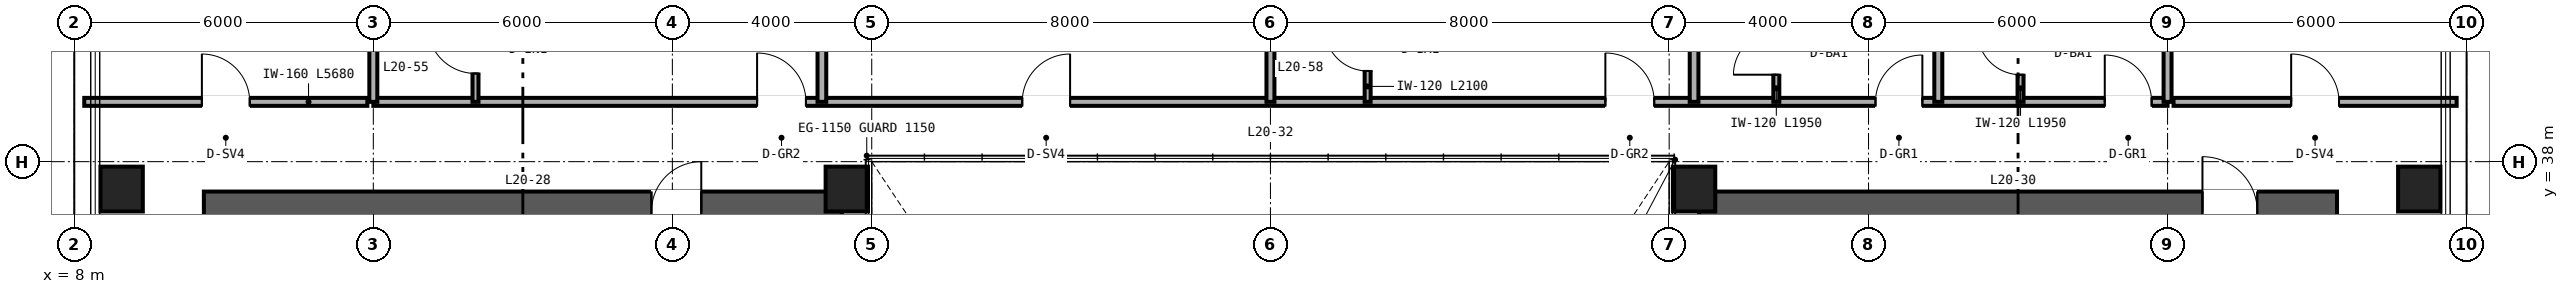
"""IFC4 building model, lengths in metres.
Left out: names, types, materials, properties, quantities, classifications, styles, units other than length and angle.
Written with IfcOpenShell. Run it as: python <this file> out.ifc"""

import sys

from ifc_helpers import new_model, si_unit, direction, frame, frame_2d, origin, origin_2d, place, context, subcontext, project, spatial, rectangle, hollow_rectangle, extrude, source, transform, mapped, element, fill, save


model = new_model("IFC4")
c1 = context("Model", 3, precision=1e-05, world=origin(), true_north=direction((0.0, 1.0)))
c2 = subcontext(c1, "Body", "Model", "MODEL_VIEW")
j1 = project(units=[si_unit("LENGTHUNIT", "METRE"), si_unit("PLANEANGLEUNIT", "RADIAN")], contexts=[c1])
p1 = place(None, origin())
s1 = spatial("IfcSite", under=j1, at=p1, CompositionType="ELEMENT")
p2 = place(p1, origin())
s2 = spatial("IfcBuilding", under=s1, at=p2, CompositionType="ELEMENT")
p3 = place(p2, frame((0.0, 0.0, 81.6)))
s3 = spatial("IfcBuildingStorey", under=s2, at=p3, CompositionType="ELEMENT", Elevation=81.6)
p4 = place(p3, frame((10.6, 37.0, 0.0), z_axis=(0.0, 0.0, 1.0), x_axis=(1.0, 0.0, 0.0)))
e1 = element("IfcWall", 1, at=p4, inside=s3, PredefinedType="SHEAR", context=c2, shape_type="SweptSolid", body=[
    extrude(rectangle(XDim=12.8, YDim=0.8, at=frame_2d((6.4, 0.0))), origin(), (0.0, 0.0, 1.0), 3.28),
])
p5 = place(p4, frame((8.98, 0.0, 0.0)))
e2 = element("IfcOpeningElement", 2, at=p5, cuts=e1, PredefinedType="OPENING", context=c2, shape_type="SweptSolid", body=[
    extrude(rectangle(XDim=1.0, YDim=2.15, at=frame_2d((0.5, 1.075))), frame((0.0, 0.41, 0.0), z_axis=(0.0, -1.0, 0.0), x_axis=(1.0, 0.0, 0.0)), (0.0, 0.0, 1.0), 0.82),
])
p6 = place(p3, frame((40.6, 37.0, 0.0), z_axis=(0.0, 0.0, 1.0), x_axis=(1.0, 0.0, 0.0)))
e3 = element("IfcWall", 3, at=p6, inside=s3, PredefinedType="SHEAR", context=c2, shape_type="SweptSolid", body=[
    extrude(rectangle(XDim=12.8, YDim=0.8, at=frame_2d((6.4, 0.0))), origin(), (0.0, 0.0, 1.0), 3.28),
])
p7 = place(p6, frame((10.1, 0.0, 0.0)))
e4 = element("IfcOpeningElement", 4, at=p7, cuts=e3, PredefinedType="OPENING", context=c2, shape_type="SweptSolid", body=[
    extrude(rectangle(XDim=1.1, YDim=2.15, at=frame_2d((0.55, 1.075))), frame((0.0, 0.41, 0.0), z_axis=(0.0, -1.0, 0.0), x_axis=(1.0, 0.0, 0.0)), (0.0, 0.0, 1.0), 0.82),
])
m1 = source(origin(), c2, "Body", "SweptSolid", [
    extrude(hollow_rectangle(XDim=0.85, YDim=0.9, WallThickness=0.04, at=origin_2d()), origin(), (0.0, 0.0, 1.0), 3.28),
])
for number, where, z_axis, x_axis in (
    (5, (8.95, 37.45, 0.0), (0.0, 0.0, 1.0), (1.0, 0.0, 0.0)),
    (6, (23.5, 37.45, 0.0), (0.0, 0.0, 1.0), (1.0, 0.0, 0.0)),
    (7, (40.5, 37.45, 0.0), (0.0, 0.0, 1.0), (1.0, 0.0, 0.0)),
    (8, (55.05, 37.45, 0.0), (0.0, 0.0, 1.0), (1.0, 0.0, 0.0)),
):
    element("IfcColumn", number, at=place(p3, frame(where, z_axis=z_axis, x_axis=x_axis)), inside=s3, PredefinedType="COLUMN", context=c2, shape_type="MappedRepresentation", body=[
        mapped(m1, transform((0.0, 0.0, 0.0), scale=1.0)),
    ])
p8 = place(p3, frame((8.2, 39.2, 0.0), z_axis=(0.0, 0.0, 1.0), x_axis=(1.0, 0.0, 0.0)))
e9 = element("IfcWall", 9, at=p8, inside=s3, PredefinedType="PARTITIONING", context=c2, shape_type="SweptSolid", body=[
    extrude(rectangle(XDim=5.68, YDim=0.16, at=frame_2d((2.84, 0.0))), origin(), (0.0, 0.0, 1.0), 3.28),
])
p9 = place(p8, frame((2.36, 0.0, 0.0)))
e10 = element("IfcOpeningElement", 10, at=p9, cuts=e9, PredefinedType="OPENING", context=c2, shape_type="SweptSolid", body=[
    extrude(rectangle(XDim=0.96, YDim=2.15, at=frame_2d((0.48, 1.075))), frame((0.0, 0.09, 0.0), z_axis=(0.0, -1.0, 0.0), x_axis=(1.0, 0.0, 0.0)), (0.0, 0.0, 1.0), 0.18),
])
p10 = place(p3, frame((50.12, 39.2, 0.0), z_axis=(0.0, 0.0, 1.0), x_axis=(1.0, 0.0, 0.0)))
e11 = element("IfcWall", 11, at=p10, inside=s3, PredefinedType="PARTITIONING", context=c2, shape_type="SweptSolid", body=[
    extrude(rectangle(XDim=5.68, YDim=0.16, at=frame_2d((2.84, 0.0))), origin(), (0.0, 0.0, 1.0), 3.28),
])
p11 = place(p10, frame((2.36, 0.0, 0.0)))
e12 = element("IfcOpeningElement", 12, at=p11, cuts=e11, PredefinedType="OPENING", context=c2, shape_type="SweptSolid", body=[
    extrude(rectangle(XDim=0.96, YDim=2.15, at=frame_2d((0.48, 1.075))), frame((0.0, 0.09, 0.0), z_axis=(0.0, -1.0, 0.0), x_axis=(1.0, 0.0, 0.0)), (0.0, 0.0, 1.0), 0.18),
])
p12 = place(p3, frame((14.0, 39.2, 0.0), z_axis=(0.0, 0.0, 1.0), x_axis=(1.0, 0.0, 0.0)))
e13 = element("IfcWall", 13, at=p12, inside=s3, PredefinedType="PARTITIONING", context=c2, shape_type="SweptSolid", body=[
    extrude(rectangle(XDim=36.0, YDim=0.16, at=frame_2d((18.0, 0.0))), origin(), (0.0, 0.0, 1.0), 2.501),
])
p13 = place(p12, frame((7.7, 0.0, 0.0)))
e14 = element("IfcOpeningElement", 14, at=p13, cuts=e13, PredefinedType="OPENING", context=c2, shape_type="SweptSolid", body=[
    extrude(rectangle(XDim=0.98, YDim=2.2, at=frame_2d((0.49, 1.1))), frame((0.0, 0.09, 0.0), z_axis=(0.0, -1.0, 0.0), x_axis=(1.0, 0.0, 0.0)), (0.0, 0.0, 1.0), 0.18),
])
p14 = place(p12, frame((13.02, 0.0, 0.0)))
e15 = element("IfcOpeningElement", 15, at=p14, cuts=e13, PredefinedType="OPENING", context=c2, shape_type="SweptSolid", body=[
    extrude(rectangle(XDim=0.96, YDim=2.15, at=frame_2d((0.48, 1.075))), frame((0.0, 0.09, 0.0), z_axis=(0.0, -1.0, 0.0), x_axis=(1.0, 0.0, 0.0)), (0.0, 0.0, 1.0), 0.18),
])
p15 = place(p12, frame((24.72, 0.0, 0.0)))
e16 = element("IfcOpeningElement", 16, at=p15, cuts=e13, PredefinedType="OPENING", context=c2, shape_type="SweptSolid", body=[
    extrude(rectangle(XDim=0.98, YDim=2.2, at=frame_2d((0.49, 1.1))), frame((0.0, 0.09, 0.0), z_axis=(0.0, -1.0, 0.0), x_axis=(1.0, 0.0, 0.0)), (0.0, 0.0, 1.0), 0.18),
])
p16 = place(p12, frame((30.14, 0.0, 0.0)))
e17 = element("IfcOpeningElement", 17, at=p16, cuts=e13, PredefinedType="OPENING", context=c2, shape_type="SweptSolid", body=[
    extrude(rectangle(XDim=0.94, YDim=2.15, at=frame_2d((0.47, 1.075))), frame((0.0, 0.09, 0.0), z_axis=(0.0, -1.0, 0.0), x_axis=(1.0, 0.0, 0.0)), (0.0, 0.0, 1.0), 0.18),
])
p17 = place(p12, frame((34.74, 0.0, 0.0)))
e18 = element("IfcOpeningElement", 18, at=p17, cuts=e13, PredefinedType="OPENING", context=c2, shape_type="SweptSolid", body=[
    extrude(rectangle(XDim=0.94, YDim=2.15, at=frame_2d((0.47, 1.075))), frame((0.0, 0.09, 0.0), z_axis=(0.0, -1.0, 0.0), x_axis=(1.0, 0.0, 0.0)), (0.0, 0.0, 1.0), 0.18),
])
for number, where, z_axis, x_axis in (
    (19, (14.0, 39.2, 0.0), (0.0, 0.0, 1.0), (0.0, 1.0, 0.0)),
    (20, (50.0, 39.2, 0.0), (0.0, 0.0, 1.0), (0.0, 1.0, 0.0)),
):
    element("IfcWall", number, at=place(p3, frame(where, z_axis=z_axis, x_axis=x_axis)), inside=s3, PredefinedType="PARTITIONING", context=c2, shape_type="SweptSolid", body=[
        extrude(rectangle(XDim=10.44, YDim=0.16, at=frame_2d((5.22, 0.0))), origin(), (0.0, 0.0, 1.0), 2.587),
    ])
p18 = place(p3, frame((23.0, 39.2, 0.0), z_axis=(0.0, 0.0, 1.0), x_axis=(0.0, 1.0, 0.0)))
e21 = element("IfcWall", 21, at=p18, inside=s3, PredefinedType="PARTITIONING", context=c2, shape_type="SweptSolid", body=[
    extrude(rectangle(XDim=10.44, YDim=0.175, at=frame_2d((5.22, 0.0))), origin(), (0.0, 0.0, 1.0), 2.743),
])
p19 = place(p3, frame((16.05, 39.2, 0.0), z_axis=(0.0, 0.0, 1.0), x_axis=(0.0, 1.0, 0.0)))
e22 = element("IfcWall", 22, at=p19, inside=s3, PredefinedType="PARTITIONING", context=c2, shape_type="SweptSolid", body=[
    extrude(rectangle(XDim=2.1, YDim=0.12, at=frame_2d((1.05, 0.0))), origin(), (0.0, 0.0, 1.0), 3.28),
])
p20 = place(p19, frame((0.57, 0.0, 0.0)))
e23 = element("IfcOpeningElement", 23, at=p20, cuts=e22, PredefinedType="OPENING", context=c2, shape_type="SweptSolid", body=[
    extrude(rectangle(XDim=0.96, YDim=2.15, at=frame_2d((0.48, 1.075))), frame((0.0, 0.07, 0.0), z_axis=(0.0, -1.0, 0.0), x_axis=(1.0, 0.0, 0.0)), (0.0, 0.0, 1.0), 0.14),
])
p21 = place(p3, frame((32.0, 39.2, 0.0), z_axis=(0.0, 0.0, 1.0), x_axis=(0.0, 1.0, 0.0)))
e24 = element("IfcWall", 24, at=p21, inside=s3, PredefinedType="PARTITIONING", context=c2, shape_type="SweptSolid", body=[
    extrude(rectangle(XDim=10.44, YDim=0.16, at=frame_2d((5.22, 0.0))), origin(), (0.0, 0.0, 1.0), 2.36),
])
p22 = place(p3, frame((40.5, 39.2, 0.0), z_axis=(0.0, 0.0, 1.0), x_axis=(0.0, 1.0, 0.0)))
e25 = element("IfcWall", 25, at=p22, inside=s3, PredefinedType="PARTITIONING", context=c2, shape_type="SweptSolid", body=[
    extrude(rectangle(XDim=10.44, YDim=0.175, at=frame_2d((5.22, 0.0))), origin(), (0.0, 0.0, 1.0), 2.36),
])
p23 = place(p3, frame((33.95, 39.2, 0.0), z_axis=(0.0, 0.0, 1.0), x_axis=(0.0, 1.0, 0.0)))
e26 = element("IfcWall", 26, at=p23, inside=s3, PredefinedType="PARTITIONING", context=c2, shape_type="SweptSolid", body=[
    extrude(rectangle(XDim=2.1, YDim=0.12, at=frame_2d((1.05, 0.0))), origin(), (0.0, 0.0, 1.0), 3.28),
])
p24 = place(p23, frame((0.62, 0.0, 0.0)))
e27 = element("IfcOpeningElement", 27, at=p24, cuts=e26, PredefinedType="OPENING", context=c2, shape_type="SweptSolid", body=[
    extrude(rectangle(XDim=0.86, YDim=2.1, at=frame_2d((0.43, 1.05))), frame((0.0, 0.07, 0.0), z_axis=(0.0, -1.0, 0.0), x_axis=(1.0, 0.0, 0.0)), (0.0, 0.0, 1.0), 0.14),
])
p25 = place(p3, frame((45.4, 39.2, 0.0), z_axis=(0.0, 0.0, 1.0), x_axis=(0.0, 1.0, 0.0)))
e28 = element("IfcWall", 28, at=p25, inside=s3, PredefinedType="PARTITIONING", context=c2, shape_type="SweptSolid", body=[
    extrude(rectangle(XDim=10.44, YDim=0.16, at=frame_2d((5.22, 0.0))), origin(), (0.0, 0.0, 1.0), 2.587),
])
p26 = place(p3, frame((42.15, 39.2, 0.0), z_axis=(0.0, 0.0, 1.0), x_axis=(0.0, 1.0, 0.0)))
e29 = element("IfcWall", 29, at=p26, inside=s3, PredefinedType="PARTITIONING", context=c2, shape_type="SweptSolid", body=[
    extrude(rectangle(XDim=1.95, YDim=0.12, at=frame_2d((0.975, 0.0))), origin(), (0.0, 0.0, 1.0), 3.28),
])
p27 = place(p26, frame((0.545, 0.0, 0.0)))
e30 = element("IfcOpeningElement", 30, at=p27, cuts=e29, PredefinedType="OPENING", context=c2, shape_type="SweptSolid", body=[
    extrude(rectangle(XDim=0.86, YDim=2.1, at=frame_2d((0.43, 1.05))), frame((0.0, 0.07, 0.0), z_axis=(0.0, -1.0, 0.0), x_axis=(1.0, 0.0, 0.0)), (0.0, 0.0, 1.0), 0.14),
])
p28 = place(p3, frame((47.05, 39.2, 0.0), z_axis=(0.0, 0.0, 1.0), x_axis=(0.0, 1.0, 0.0)))
e31 = element("IfcWall", 31, at=p28, inside=s3, PredefinedType="PARTITIONING", context=c2, shape_type="SweptSolid", body=[
    extrude(rectangle(XDim=1.95, YDim=0.12, at=frame_2d((0.975, 0.0))), origin(), (0.0, 0.0, 1.0), 3.28),
])
p29 = place(p28, frame((0.545, 0.0, 0.0)))
e32 = element("IfcOpeningElement", 32, at=p29, cuts=e31, PredefinedType="OPENING", context=c2, shape_type="SweptSolid", body=[
    extrude(rectangle(XDim=0.86, YDim=2.1, at=frame_2d((0.43, 1.05))), frame((0.0, 0.07, 0.0), z_axis=(0.0, -1.0, 0.0), x_axis=(1.0, 0.0, 0.0)), (0.0, 0.0, 1.0), 0.14),
])
m2 = source(origin(), c2, "Body", "SweptSolid", [
    extrude(rectangle(XDim=1.0, YDim=2.15, at=frame_2d((0.5, 1.075))), frame((0.0, 0.025, 0.0), z_axis=(0.0, -1.0, 0.0), x_axis=(1.0, 0.0, 0.0)), (0.0, 0.0, 1.0), 0.05),
])
p30 = place(p5, origin())
e33 = element("IfcDoor", 33, at=p30, inside=s3, OperationType="SINGLE_SWING_RIGHT", PredefinedType="DOOR", context=c2, shape_type="MappedRepresentation", body=[
    mapped(m2, transform((0.0, 0.0, 0.0), scale=1.0)),
])
fill(e2, e33)
m3 = source(origin(), c2, "Body", "SweptSolid", [
    extrude(rectangle(XDim=1.1, YDim=2.15, at=frame_2d((0.55, 1.075))), frame((0.0, 0.025, 0.0), z_axis=(0.0, -1.0, 0.0), x_axis=(1.0, 0.0, 0.0)), (0.0, 0.0, 1.0), 0.05),
])
p31 = place(p7, origin())
e34 = element("IfcDoor", 34, at=p31, inside=s3, OperationType="SINGLE_SWING_LEFT", PredefinedType="DOOR", context=c2, shape_type="MappedRepresentation", body=[
    mapped(m3, transform((0.0, 0.0, 0.0), scale=1.0)),
])
fill(e4, e34)
m4 = source(origin(), c2, "Body", "SweptSolid", [
    extrude(rectangle(XDim=0.96, YDim=2.15, at=frame_2d((0.48, 1.075))), frame((0.0, 0.025, 0.0), z_axis=(0.0, -1.0, 0.0), x_axis=(1.0, 0.0, 0.0)), (0.0, 0.0, 1.0), 0.05),
])
p32 = place(p9, origin())
e35 = element("IfcDoor", 35, at=p32, inside=s3, OperationType="SINGLE_SWING_LEFT", PredefinedType="DOOR", context=c2, shape_type="MappedRepresentation", body=[
    mapped(m4, transform((0.0, 0.0, 0.0), scale=1.0)),
])
fill(e10, e35)
p33 = place(p11, origin())
e36 = element("IfcDoor", 36, at=p33, inside=s3, OperationType="SINGLE_SWING_LEFT", PredefinedType="DOOR", context=c2, shape_type="MappedRepresentation", body=[
    mapped(m4, transform((0.0, 0.0, 0.0), scale=1.0)),
])
fill(e12, e36)
p34 = place(p20, origin())
e37 = element("IfcDoor", 37, at=p34, inside=s3, OperationType="SINGLE_SWING_RIGHT", PredefinedType="DOOR", context=c2, shape_type="MappedRepresentation", body=[
    mapped(m4, transform((0.0, 0.0, 0.0), scale=1.0)),
])
fill(e23, e37)
m5 = source(origin(), c2, "Body", "SweptSolid", [
    extrude(rectangle(XDim=0.86, YDim=2.1, at=frame_2d((0.43, 1.05))), frame((0.0, 0.025, 0.0), z_axis=(0.0, -1.0, 0.0), x_axis=(1.0, 0.0, 0.0)), (0.0, 0.0, 1.0), 0.05),
])
p35 = place(p24, origin())
e38 = element("IfcDoor", 38, at=p35, inside=s3, OperationType="SINGLE_SWING_RIGHT", PredefinedType="DOOR", context=c2, shape_type="MappedRepresentation", body=[
    mapped(m5, transform((0.0, 0.0, 0.0), scale=1.0)),
])
fill(e27, e38)
p36 = place(p27, origin())
e39 = element("IfcDoor", 39, at=p36, inside=s3, OperationType="SINGLE_SWING_LEFT", PredefinedType="DOOR", context=c2, shape_type="MappedRepresentation", body=[
    mapped(m5, transform((0.0, 0.0, 0.0), scale=1.0)),
])
fill(e30, e39)
p37 = place(p29, origin())
e40 = element("IfcDoor", 40, at=p37, inside=s3, OperationType="SINGLE_SWING_RIGHT", PredefinedType="DOOR", context=c2, shape_type="MappedRepresentation", body=[
    mapped(m5, transform((0.0, 0.0, 0.0), scale=1.0)),
])
fill(e32, e40)
m6 = source(origin(), c2, "Body", "SweptSolid", [
    extrude(rectangle(XDim=0.98, YDim=2.2, at=frame_2d((0.49, 1.1))), frame((0.0, 0.025, 0.0), z_axis=(0.0, -1.0, 0.0), x_axis=(1.0, 0.0, 0.0)), (0.0, 0.0, 1.0), 0.05),
])
p38 = place(p13, origin())
e41 = element("IfcDoor", 41, at=p38, inside=s3, OperationType="SINGLE_SWING_LEFT", PredefinedType="DOOR", context=c2, shape_type="MappedRepresentation", body=[
    mapped(m6, transform((0.0, 0.0, 0.0), scale=1.0)),
])
fill(e14, e41)
p39 = place(p14, origin())
e42 = element("IfcDoor", 42, at=p39, inside=s3, OperationType="SINGLE_SWING_RIGHT", PredefinedType="DOOR", context=c2, shape_type="MappedRepresentation", body=[
    mapped(m4, transform((0.0, 0.0, 0.0), scale=1.0)),
])
fill(e15, e42)
p40 = place(p15, origin())
e43 = element("IfcDoor", 43, at=p40, inside=s3, OperationType="SINGLE_SWING_LEFT", PredefinedType="DOOR", context=c2, shape_type="MappedRepresentation", body=[
    mapped(m6, transform((0.0, 0.0, 0.0), scale=1.0)),
])
fill(e16, e43)
m7 = source(origin(), c2, "Body", "SweptSolid", [
    extrude(rectangle(XDim=0.94, YDim=2.15, at=frame_2d((0.47, 1.075))), frame((0.0, 0.025, 0.0), z_axis=(0.0, -1.0, 0.0), x_axis=(1.0, 0.0, 0.0)), (0.0, 0.0, 1.0), 0.05),
])
p41 = place(p16, origin())
e44 = element("IfcDoor", 44, at=p41, inside=s3, OperationType="SINGLE_SWING_RIGHT", PredefinedType="DOOR", context=c2, shape_type="MappedRepresentation", body=[
    mapped(m7, transform((0.0, 0.0, 0.0), scale=1.0)),
])
fill(e17, e44)
p42 = place(p17, origin())
e45 = element("IfcDoor", 45, at=p42, inside=s3, OperationType="SINGLE_SWING_LEFT", PredefinedType="DOOR", context=c2, shape_type="MappedRepresentation", body=[
    mapped(m7, transform((0.0, 0.0, 0.0), scale=1.0)),
])
fill(e18, e45)
save(model, sys.argv[1])
